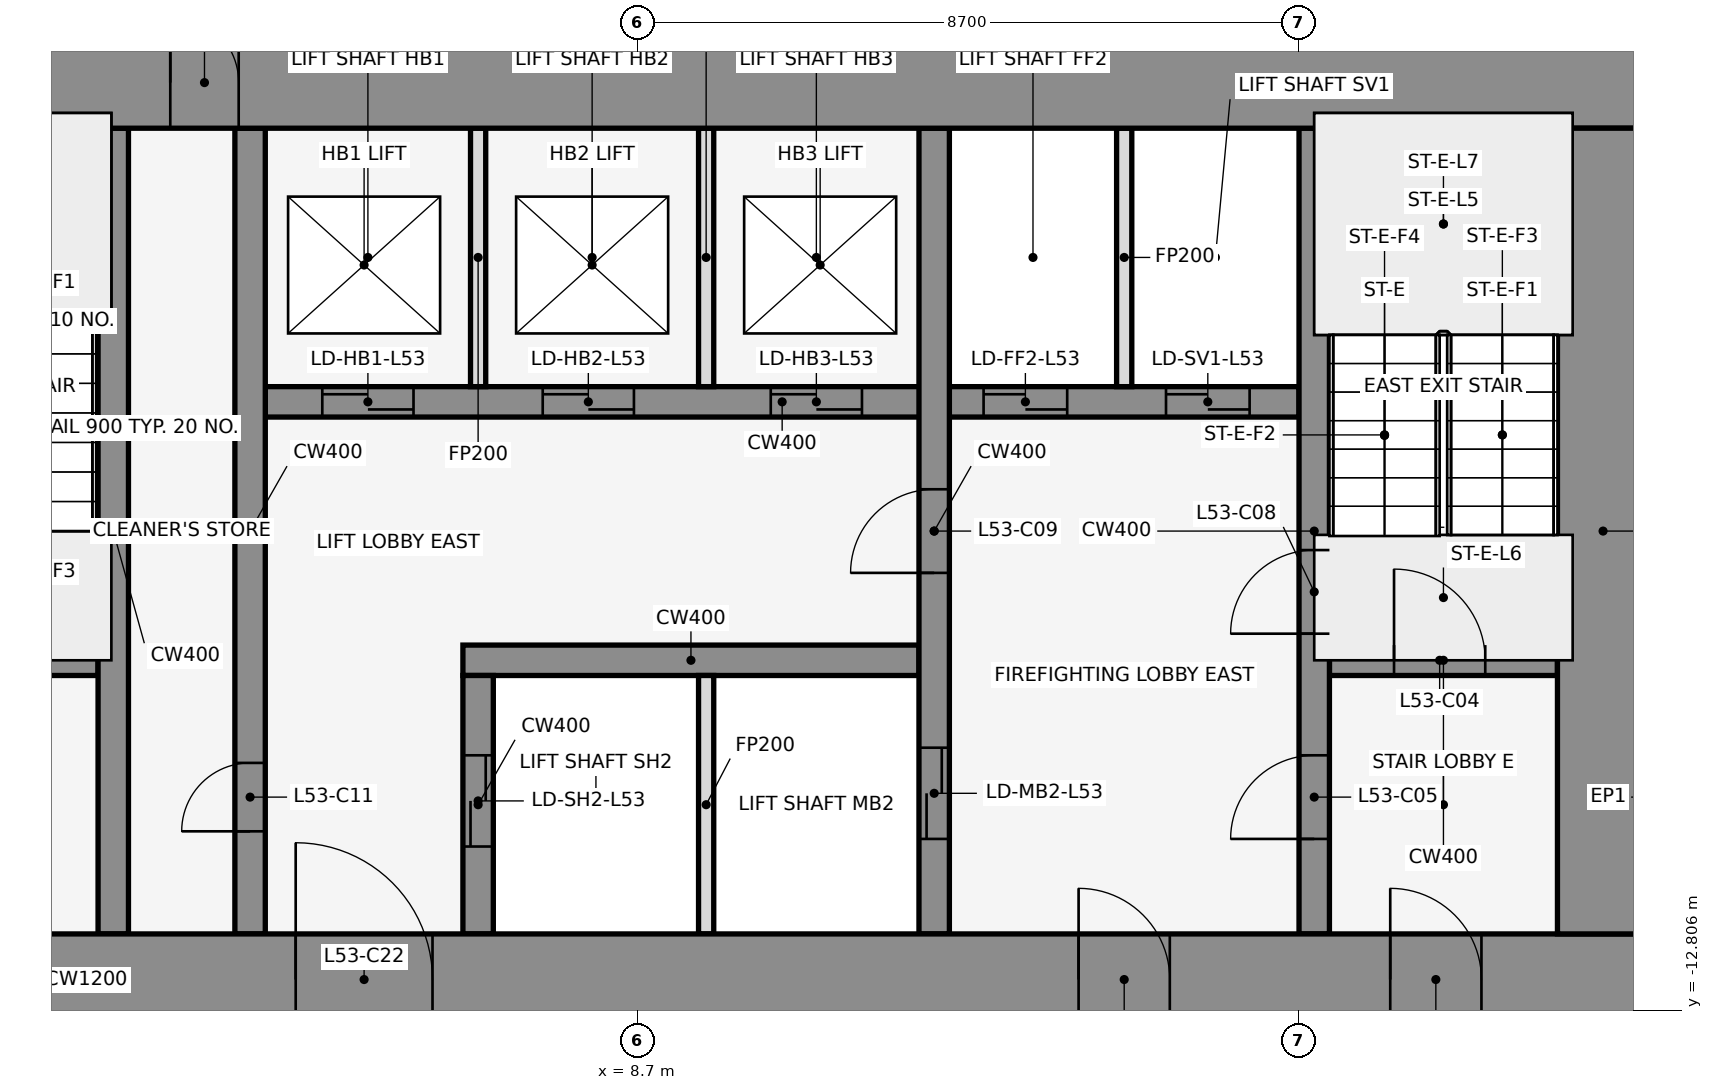
"""IFC4 building model, lengths in metres.
Left out: names, types, materials, properties, quantities, classifications, styles, units other than length and angle.
Written with IfcOpenShell. Run it as: python <this file> out.ifc"""

import sys

from ifc_helpers import new_model, si_unit, direction, frame, frame_2d, origin, place, context, subcontext, project, spatial, rectangle, extrude, element, fill, save


model = new_model("IFC4")
c1 = context("Model", 3, precision=1e-05, world=origin(), true_north=direction((0.0, 1.0)))
c2 = subcontext(c1, "Body", "Model", "MODEL_VIEW")
j1 = project(units=[si_unit("LENGTHUNIT", "METRE"), si_unit("PLANEANGLEUNIT", "RADIAN")], contexts=[c1])
p1 = place(None, origin())
s1 = spatial("IfcSite", under=j1, at=p1, CompositionType="ELEMENT")
p2 = place(p1, origin())
s2 = spatial("IfcBuilding", under=s1, at=p2, CompositionType="ELEMENT")
p3 = place(p2, frame((0.0, 0.0, 236.0)))
s3 = spatial("IfcBuildingStorey", under=s2, at=p3, CompositionType="ELEMENT", Elevation=236.0)
for number, where, z_axis, x_axis in (
    (1, (16.432, -0.105, 0.0), (0.0, 0.0, 1.0), (-0.84, 0.543, 0.0)),
    (2, (1.901, 1.08, 0.0), (0.0, 0.0, 1.0), (-0.84, -0.543, 0.0)),
):
    element("IfcWall", number, at=place(p3, frame(where, z_axis=z_axis, x_axis=x_axis)), inside=s3, PredefinedType="STANDARD", context=c2, shape_type="SweptSolid", body=[
        extrude(rectangle(XDim=2.183, YDim=0.25, at=frame_2d((1.091, 0.0))), origin(), (0.0, 0.0, 1.0), 5.25),
    ])
p4 = place(p3, frame((-1.6, -8.2, 0.0), z_axis=(0.0, 0.0, 1.0), x_axis=(1.0, 0.0, 0.0)))
e3 = element("IfcWall", 3, at=p4, inside=s3, PredefinedType="SHEAR", context=c2, shape_type="SweptSolid", body=[
    extrude(rectangle(XDim=3.2, YDim=0.4, at=frame_2d((1.6, 0.0))), origin(), (0.0, 0.0, 1.0), 5.4),
])
p5 = place(p4, frame((1.05, 0.0, 0.0)))
e4 = element("IfcOpeningElement", 4, at=p5, cuts=e3, PredefinedType="OPENING", context=c2, shape_type="SweptSolid", body=[
    extrude(rectangle(XDim=1.2, YDim=2.1, at=frame_2d((0.6, 1.05))), frame((0.0, 0.212, 0.0), z_axis=(0.0, -1.0, 0.0), x_axis=(1.0, 0.0, 0.0)), (0.0, 0.0, 1.0), 0.424),
])
p6 = place(p3, frame((6.4, -8.2, 0.0), z_axis=(0.0, 0.0, 1.0), x_axis=(1.0, 0.0, 0.0)))
e5 = element("IfcWall", 5, at=p6, inside=s3, PredefinedType="SHEAR", context=c2, shape_type="SweptSolid", body=[
    extrude(rectangle(XDim=6.0, YDim=0.4, at=frame_2d((3.0, 0.0))), origin(), (0.0, 0.0, 1.0), 5.4),
])
p7 = place(p3, frame((17.8, -8.2, 0.0), z_axis=(0.0, 0.0, 1.0), x_axis=(1.0, 0.0, 0.0)))
e6 = element("IfcWall", 6, at=p7, inside=s3, PredefinedType="SHEAR", context=c2, shape_type="SweptSolid", body=[
    extrude(rectangle(XDim=3.0, YDim=0.4, at=frame_2d((1.5, 0.0))), origin(), (0.0, 0.0, 1.0), 5.4),
])
p8 = place(p7, frame((0.85, 0.0, 0.0)))
e7 = element("IfcOpeningElement", 7, at=p8, cuts=e6, PredefinedType="OPENING", context=c2, shape_type="SweptSolid", body=[
    extrude(rectangle(XDim=1.2, YDim=2.1, at=frame_2d((0.6, 1.05))), frame((0.0, 0.212, 0.0), z_axis=(0.0, -1.0, 0.0), x_axis=(1.0, 0.0, 0.0)), (0.0, 0.0, 1.0), 0.424),
])
p9 = place(p3, frame((3.8, -4.8, 0.0), z_axis=(0.0, 0.0, 1.0), x_axis=(1.0, 0.0, 0.0)))
e8 = element("IfcWall", 8, at=p9, inside=s3, PredefinedType="SHEAR", context=c2, shape_type="SweptSolid", body=[
    extrude(rectangle(XDim=13.6, YDim=0.4, at=frame_2d((6.8, 0.0))), origin(), (0.0, 0.0, 1.0), 5.4),
])
p10 = place(p9, frame((0.75, 0.0, 0.0)))
e9 = element("IfcOpeningElement", 9, at=p10, cuts=e8, PredefinedType="OPENING", context=c2, shape_type="SweptSolid", body=[
    extrude(rectangle(XDim=1.2, YDim=2.1, at=frame_2d((0.6, 1.05))), frame((0.0, 0.212, 0.0), z_axis=(0.0, -1.0, 0.0), x_axis=(1.0, 0.0, 0.0)), (0.0, 0.0, 1.0), 0.424),
])
p11 = place(p9, frame((3.65, 0.0, 0.0)))
e10 = element("IfcOpeningElement", 10, at=p11, cuts=e8, PredefinedType="OPENING", context=c2, shape_type="SweptSolid", body=[
    extrude(rectangle(XDim=1.2, YDim=2.1, at=frame_2d((0.6, 1.05))), frame((0.0, 0.212, 0.0), z_axis=(0.0, -1.0, 0.0), x_axis=(1.0, 0.0, 0.0)), (0.0, 0.0, 1.0), 0.424),
])
p12 = place(p9, frame((6.65, 0.0, 0.0)))
e11 = element("IfcOpeningElement", 11, at=p12, cuts=e8, PredefinedType="OPENING", context=c2, shape_type="SweptSolid", body=[
    extrude(rectangle(XDim=1.2, YDim=2.1, at=frame_2d((0.6, 1.05))), frame((0.0, 0.212, 0.0), z_axis=(0.0, -1.0, 0.0), x_axis=(1.0, 0.0, 0.0)), (0.0, 0.0, 1.0), 0.424),
])
p13 = place(p9, frame((9.45, 0.0, 0.0)))
e12 = element("IfcOpeningElement", 12, at=p13, cuts=e8, PredefinedType="OPENING", context=c2, shape_type="SweptSolid", body=[
    extrude(rectangle(XDim=1.1, YDim=2.1, at=frame_2d((0.55, 1.05))), frame((0.0, 0.212, 0.0), z_axis=(0.0, -1.0, 0.0), x_axis=(1.0, 0.0, 0.0)), (0.0, 0.0, 1.0), 0.424),
])
p14 = place(p9, frame((11.85, 0.0, 0.0)))
e13 = element("IfcOpeningElement", 13, at=p14, cuts=e8, PredefinedType="OPENING", context=c2, shape_type="SweptSolid", body=[
    extrude(rectangle(XDim=1.1, YDim=2.1, at=frame_2d((0.55, 1.05))), frame((0.0, 0.212, 0.0), z_axis=(0.0, -1.0, 0.0), x_axis=(1.0, 0.0, 0.0)), (0.0, 0.0, 1.0), 0.424),
])
p15 = place(p3, frame((1.8, -11.8, 0.0), z_axis=(0.0, 0.0, 1.0), x_axis=(0.0, 1.0, 0.0)))
e14 = element("IfcWall", 14, at=p15, inside=s3, PredefinedType="SHEAR", context=c2, shape_type="SweptSolid", body=[
    extrude(rectangle(XDim=10.6, YDim=0.4, at=frame_2d((5.3, 0.0))), origin(), (0.0, 0.0, 1.0), 5.4),
])
p16 = place(p3, frame((3.6, -11.8, 0.0), z_axis=(0.0, 0.0, 1.0), x_axis=(0.0, 1.0, 0.0)))
e15 = element("IfcWall", 15, at=p16, inside=s3, PredefinedType="SHEAR", context=c2, shape_type="SweptSolid", body=[
    extrude(rectangle(XDim=10.6, YDim=0.4, at=frame_2d((5.3, 0.0))), origin(), (0.0, 0.0, 1.0), 5.4),
])
p17 = place(p16, frame((1.35, 0.0, 0.0)))
e16 = element("IfcOpeningElement", 16, at=p17, cuts=e15, PredefinedType="OPENING", context=c2, shape_type="SweptSolid", body=[
    extrude(rectangle(XDim=0.9, YDim=2.1, at=frame_2d((0.45, 1.05))), frame((0.0, 0.212, 0.0), z_axis=(0.0, -1.0, 0.0), x_axis=(1.0, 0.0, 0.0)), (0.0, 0.0, 1.0), 0.424),
])
p18 = place(p3, frame((6.6, -11.8, 0.0), z_axis=(0.0, 0.0, 1.0), x_axis=(0.0, 1.0, 0.0)))
e17 = element("IfcWall", 17, at=p18, inside=s3, PredefinedType="SHEAR", context=c2, shape_type="SweptSolid", body=[
    extrude(rectangle(XDim=3.4, YDim=0.4, at=frame_2d((1.7, 0.0))), origin(), (0.0, 0.0, 1.0), 5.4),
])
p19 = place(p18, frame((1.15, 0.0, 0.0)))
e18 = element("IfcOpeningElement", 18, at=p19, cuts=e17, PredefinedType="OPENING", context=c2, shape_type="SweptSolid", body=[
    extrude(rectangle(XDim=1.2, YDim=2.1, at=frame_2d((0.6, 1.05))), frame((0.0, 0.212, 0.0), z_axis=(0.0, -1.0, 0.0), x_axis=(1.0, 0.0, 0.0)), (0.0, 0.0, 1.0), 0.424),
])
for number, where, z_axis, x_axis in (
    (19, (6.6, -4.6, 0.0), (0.0, 0.0, 1.0), (0.0, 1.0, 0.0)),
    (20, (9.6, -11.8, 0.0), (0.0, 0.0, 1.0), (0.0, 1.0, 0.0)),
    (21, (9.6, -4.6, 0.0), (0.0, 0.0, 1.0), (0.0, 1.0, 0.0)),
):
    element("IfcWall", number, at=place(p3, frame(where, z_axis=z_axis, x_axis=x_axis)), inside=s3, PredefinedType="PARTITIONING", context=c2, shape_type="SweptSolid", body=[
        extrude(rectangle(XDim=3.4, YDim=0.2, at=frame_2d((1.7, 0.0))), origin(), (0.0, 0.0, 1.0), 4.318),
    ])
p20 = place(p3, frame((12.6, -11.8, 0.0), z_axis=(0.0, 0.0, 1.0), x_axis=(0.0, 1.0, 0.0)))
e22 = element("IfcWall", 22, at=p20, inside=s3, PredefinedType="SHEAR", context=c2, shape_type="SweptSolid", body=[
    extrude(rectangle(XDim=10.6, YDim=0.4, at=frame_2d((5.3, 0.0))), origin(), (0.0, 0.0, 1.0), 5.4),
])
p21 = place(p20, frame((1.25, 0.0, 0.0)))
e23 = element("IfcOpeningElement", 23, at=p21, cuts=e22, PredefinedType="OPENING", context=c2, shape_type="SweptSolid", body=[
    extrude(rectangle(XDim=1.2, YDim=2.1, at=frame_2d((0.6, 1.05))), frame((0.0, 0.212, 0.0), z_axis=(0.0, -1.0, 0.0), x_axis=(1.0, 0.0, 0.0)), (0.0, 0.0, 1.0), 0.424),
])
p22 = place(p20, frame((4.75, 0.0, 0.0)))
e24 = element("IfcOpeningElement", 24, at=p22, cuts=e22, PredefinedType="OPENING", context=c2, shape_type="SweptSolid", body=[
    extrude(rectangle(XDim=1.1, YDim=2.1, at=frame_2d((0.55, 1.05))), frame((0.0, 0.212, 0.0), z_axis=(0.0, -1.0, 0.0), x_axis=(1.0, 0.0, 0.0)), (0.0, 0.0, 1.0), 0.424),
])
p23 = place(p3, frame((15.1, -4.6, 0.0), z_axis=(0.0, 0.0, 1.0), x_axis=(0.0, 1.0, 0.0)))
e25 = element("IfcWall", 25, at=p23, inside=s3, PredefinedType="PARTITIONING", context=c2, shape_type="SweptSolid", body=[
    extrude(rectangle(XDim=3.4, YDim=0.2, at=frame_2d((1.7, 0.0))), origin(), (0.0, 0.0, 1.0), 4.318),
])
p24 = place(p3, frame((17.6, -11.8, 0.0), z_axis=(0.0, 0.0, 1.0), x_axis=(0.0, 1.0, 0.0)))
e26 = element("IfcWall", 26, at=p24, inside=s3, PredefinedType="SHEAR", context=c2, shape_type="SweptSolid", body=[
    extrude(rectangle(XDim=10.6, YDim=0.4, at=frame_2d((5.3, 0.0))), origin(), (0.0, 0.0, 1.0), 5.4),
])
p25 = place(p24, frame((1.25, 0.0, 0.0)))
e27 = element("IfcOpeningElement", 27, at=p25, cuts=e26, PredefinedType="OPENING", context=c2, shape_type="SweptSolid", body=[
    extrude(rectangle(XDim=1.1, YDim=2.1, at=frame_2d((0.55, 1.05))), frame((0.0, 0.212, 0.0), z_axis=(0.0, -1.0, 0.0), x_axis=(1.0, 0.0, 0.0)), (0.0, 0.0, 1.0), 0.424),
])
p26 = place(p24, frame((3.95, 0.0, 0.0)))
e28 = element("IfcOpeningElement", 28, at=p26, cuts=e26, PredefinedType="OPENING", context=c2, shape_type="SweptSolid", body=[
    extrude(rectangle(XDim=1.1, YDim=2.1, at=frame_2d((0.55, 1.05))), frame((0.0, 0.212, 0.0), z_axis=(0.0, -1.0, 0.0), x_axis=(1.0, 0.0, 0.0)), (0.0, 0.0, 1.0), 0.424),
])
p27 = place(p3, frame((-22.0, -0.6, 0.0), z_axis=(0.0, 0.0, 1.0), x_axis=(1.0, 0.0, 0.0)))
e29 = element("IfcWall", 29, at=p27, inside=s3, PredefinedType="SHEAR", context=c2, shape_type="SweptSolid", body=[
    extrude(rectangle(XDim=44.0, YDim=1.2, at=frame_2d((22.0, 0.0))), origin(), (0.0, 0.0, 1.0), 5.4),
])
p28 = place(p27, frame((18.55, 0.0, 0.0)))
e30 = element("IfcOpeningElement", 30, at=p28, cuts=e29, PredefinedType="OPENING", context=c2, shape_type="SweptSolid", body=[
    extrude(rectangle(XDim=0.9, YDim=2.1, at=frame_2d((0.45, 1.05))), frame((0.0, 0.612, 0.0), z_axis=(0.0, -1.0, 0.0), x_axis=(1.0, 0.0, 0.0)), (0.0, 0.0, 1.0), 1.224),
])
p29 = place(p27, frame((24.55, 0.0, 0.0)))
e31 = element("IfcOpeningElement", 31, at=p29, cuts=e29, PredefinedType="OPENING", context=c2, shape_type="SweptSolid", body=[
    extrude(rectangle(XDim=0.9, YDim=2.1, at=frame_2d((0.45, 1.05))), frame((0.0, 0.612, 0.0), z_axis=(0.0, -1.0, 0.0), x_axis=(1.0, 0.0, 0.0)), (0.0, 0.0, 1.0), 1.224),
])
p30 = place(p3, frame((-22.0, -12.4, 0.0), z_axis=(0.0, 0.0, 1.0), x_axis=(1.0, 0.0, 0.0)))
e32 = element("IfcWall", 32, at=p30, inside=s3, PredefinedType="SHEAR", context=c2, shape_type="SweptSolid", body=[
    extrude(rectangle(XDim=44.0, YDim=1.2, at=frame_2d((22.0, 0.0))), origin(), (0.0, 0.0, 1.0), 5.4),
])
p31 = place(p30, frame((2.2, 0.0, 0.0)))
e33 = element("IfcOpeningElement", 33, at=p31, cuts=e32, PredefinedType="OPENING", context=c2, shape_type="SweptSolid", body=[
    extrude(rectangle(XDim=1.2, YDim=2.1, at=frame_2d((0.6, 1.05))), frame((0.0, 0.612, 0.0), z_axis=(0.0, -1.0, 0.0), x_axis=(1.0, 0.0, 0.0)), (0.0, 0.0, 1.0), 1.224),
])
p32 = place(p30, frame((21.4, 0.0, 0.0)))
e34 = element("IfcOpeningElement", 34, at=p32, cuts=e32, PredefinedType="OPENING", context=c2, shape_type="SweptSolid", body=[
    extrude(rectangle(XDim=1.2, YDim=2.1, at=frame_2d((0.6, 1.05))), frame((0.0, 0.612, 0.0), z_axis=(0.0, -1.0, 0.0), x_axis=(1.0, 0.0, 0.0)), (0.0, 0.0, 1.0), 1.224),
])
p33 = place(p30, frame((40.6, 0.0, 0.0)))
e35 = element("IfcOpeningElement", 35, at=p33, cuts=e32, PredefinedType="OPENING", context=c2, shape_type="SweptSolid", body=[
    extrude(rectangle(XDim=1.2, YDim=2.1, at=frame_2d((0.6, 1.05))), frame((0.0, 0.612, 0.0), z_axis=(0.0, -1.0, 0.0), x_axis=(1.0, 0.0, 0.0)), (0.0, 0.0, 1.0), 1.224),
])
p34 = place(p30, frame((16.0, 0.0, 0.0)))
e36 = element("IfcOpeningElement", 36, at=p34, cuts=e32, PredefinedType="OPENING", context=c2, shape_type="SweptSolid", body=[
    extrude(rectangle(XDim=1.8, YDim=2.1, at=frame_2d((0.9, 1.05))), frame((0.0, 0.612, 0.0), z_axis=(0.0, -1.0, 0.0), x_axis=(1.0, 0.0, 0.0)), (0.0, 0.0, 1.0), 1.224),
])
p35 = place(p30, frame((6.3, 0.0, 0.0)))
e37 = element("IfcOpeningElement", 37, at=p35, cuts=e32, PredefinedType="OPENING", context=c2, shape_type="SweptSolid", body=[
    extrude(rectangle(XDim=1.2, YDim=2.1, at=frame_2d((0.6, 1.05))), frame((0.0, 0.612, 0.0), z_axis=(0.0, -1.0, 0.0), x_axis=(1.0, 0.0, 0.0)), (0.0, 0.0, 1.0), 1.224),
])
p36 = place(p30, frame((26.2, 0.0, 0.0)))
e38 = element("IfcOpeningElement", 38, at=p36, cuts=e32, PredefinedType="OPENING", context=c2, shape_type="SweptSolid", body=[
    extrude(rectangle(XDim=1.8, YDim=2.1, at=frame_2d((0.9, 1.05))), frame((0.0, 0.612, 0.0), z_axis=(0.0, -1.0, 0.0), x_axis=(1.0, 0.0, 0.0)), (0.0, 0.0, 1.0), 1.224),
])
p37 = place(p30, frame((36.5, 0.0, 0.0)))
e39 = element("IfcOpeningElement", 39, at=p37, cuts=e32, PredefinedType="OPENING", context=c2, shape_type="SweptSolid", body=[
    extrude(rectangle(XDim=1.2, YDim=2.1, at=frame_2d((0.6, 1.05))), frame((0.0, 0.612, 0.0), z_axis=(0.0, -1.0, 0.0), x_axis=(1.0, 0.0, 0.0)), (0.0, 0.0, 1.0), 1.224),
])
p38 = place(p3, frame((21.4, -11.8, 0.0), z_axis=(0.0, 0.0, 1.0), x_axis=(0.0, 1.0, 0.0)))
e40 = element("IfcWall", 40, at=p38, inside=s3, PredefinedType="SHEAR", context=c2, shape_type="SweptSolid", body=[
    extrude(rectangle(XDim=10.6, YDim=1.2, at=frame_2d((5.3, 0.0))), origin(), (0.0, 0.0, 1.0), 5.4),
])
p39 = place(p8, origin())
e41 = element("IfcDoor", 41, at=p39, inside=s3, OperationType="SINGLE_SWING_RIGHT", PredefinedType="DOOR", context=c2, shape_type="SweptSolid", body=[
    extrude(rectangle(XDim=1.2, YDim=2.1, at=frame_2d((0.6, 1.05))), frame((0.0, 0.025, 0.0), z_axis=(0.0, -1.0, 0.0), x_axis=(1.0, 0.0, 0.0)), (0.0, 0.0, 1.0), 0.05),
])
fill(e7, e41)
p40 = place(p25, origin())
e42 = element("IfcDoor", 42, at=p40, inside=s3, OperationType="SINGLE_SWING_LEFT", PredefinedType="DOOR", context=c2, shape_type="SweptSolid", body=[
    extrude(rectangle(XDim=1.1, YDim=2.1, at=frame_2d((0.55, 1.05))), frame((0.0, 0.025, 0.0), z_axis=(0.0, -1.0, 0.0), x_axis=(1.0, 0.0, 0.0)), (0.0, 0.0, 1.0), 0.05),
])
fill(e27, e42)
p41 = place(p10, origin())
e43 = element("IfcDoor", 43, at=p41, inside=s3, OperationType="DOUBLE_DOOR_SLIDING", PredefinedType="DOOR", context=c2, shape_type="SweptSolid", body=[
    extrude(rectangle(XDim=1.2, YDim=2.1, at=frame_2d((0.6, 1.05))), frame((0.0, 0.025, 0.0), z_axis=(0.0, -1.0, 0.0), x_axis=(1.0, 0.0, 0.0)), (0.0, 0.0, 1.0), 0.05),
])
fill(e9, e43)
p42 = place(p11, origin())
e44 = element("IfcDoor", 44, at=p42, inside=s3, OperationType="DOUBLE_DOOR_SLIDING", PredefinedType="DOOR", context=c2, shape_type="SweptSolid", body=[
    extrude(rectangle(XDim=1.2, YDim=2.1, at=frame_2d((0.6, 1.05))), frame((0.0, 0.025, 0.0), z_axis=(0.0, -1.0, 0.0), x_axis=(1.0, 0.0, 0.0)), (0.0, 0.0, 1.0), 0.05),
])
fill(e10, e44)
p43 = place(p12, origin())
e45 = element("IfcDoor", 45, at=p43, inside=s3, OperationType="DOUBLE_DOOR_SLIDING", PredefinedType="DOOR", context=c2, shape_type="SweptSolid", body=[
    extrude(rectangle(XDim=1.2, YDim=2.1, at=frame_2d((0.6, 1.05))), frame((0.0, 0.025, 0.0), z_axis=(0.0, -1.0, 0.0), x_axis=(1.0, 0.0, 0.0)), (0.0, 0.0, 1.0), 0.05),
])
fill(e11, e45)
p44 = place(p19, origin())
e46 = element("IfcDoor", 46, at=p44, inside=s3, OperationType="DOUBLE_DOOR_SLIDING", PredefinedType="DOOR", context=c2, shape_type="SweptSolid", body=[
    extrude(rectangle(XDim=1.2, YDim=2.1, at=frame_2d((0.6, 1.05))), frame((0.0, 0.025, 0.0), z_axis=(0.0, -1.0, 0.0), x_axis=(1.0, 0.0, 0.0)), (0.0, 0.0, 1.0), 0.05),
])
fill(e18, e46)
p45 = place(p21, origin())
e47 = element("IfcDoor", 47, at=p45, inside=s3, OperationType="DOUBLE_DOOR_SLIDING", PredefinedType="DOOR", context=c2, shape_type="SweptSolid", body=[
    extrude(rectangle(XDim=1.2, YDim=2.1, at=frame_2d((0.6, 1.05))), frame((0.0, 0.025, 0.0), z_axis=(0.0, -1.0, 0.0), x_axis=(1.0, 0.0, 0.0)), (0.0, 0.0, 1.0), 0.05),
])
fill(e23, e47)
p46 = place(p13, origin())
e48 = element("IfcDoor", 48, at=p46, inside=s3, OperationType="DOUBLE_DOOR_SLIDING", PredefinedType="DOOR", context=c2, shape_type="SweptSolid", body=[
    extrude(rectangle(XDim=1.1, YDim=2.1, at=frame_2d((0.55, 1.05))), frame((0.0, 0.025, 0.0), z_axis=(0.0, -1.0, 0.0), x_axis=(1.0, 0.0, 0.0)), (0.0, 0.0, 1.0), 0.05),
])
fill(e12, e48)
p47 = place(p14, origin())
e49 = element("IfcDoor", 49, at=p47, inside=s3, OperationType="DOUBLE_DOOR_SLIDING", PredefinedType="DOOR", context=c2, shape_type="SweptSolid", body=[
    extrude(rectangle(XDim=1.1, YDim=2.1, at=frame_2d((0.55, 1.05))), frame((0.0, 0.025, 0.0), z_axis=(0.0, -1.0, 0.0), x_axis=(1.0, 0.0, 0.0)), (0.0, 0.0, 1.0), 0.05),
])
fill(e13, e49)
p48 = place(p26, origin())
e50 = element("IfcDoor", 50, at=p48, inside=s3, OperationType="SINGLE_SWING_RIGHT", PredefinedType="DOOR", context=c2, shape_type="SweptSolid", body=[
    extrude(rectangle(XDim=1.1, YDim=2.1, at=frame_2d((0.55, 1.05))), frame((0.0, 0.025, 0.0), z_axis=(0.0, -1.0, 0.0), x_axis=(1.0, 0.0, 0.0)), (0.0, 0.0, 1.0), 0.05),
])
fill(e28, e50)
p49 = place(p22, frame((1.1, 0.0, 0.0), z_axis=(0.0, 0.0, 1.0), x_axis=(-1.0, 0.0, 0.0)))
e51 = element("IfcDoor", 51, at=p49, inside=s3, OperationType="SINGLE_SWING_RIGHT", PredefinedType="DOOR", context=c2, shape_type="SweptSolid", body=[
    extrude(rectangle(XDim=1.1, YDim=2.1, at=frame_2d((0.55, 1.05))), frame((0.0, 0.025, 0.0), z_axis=(0.0, -1.0, 0.0), x_axis=(1.0, 0.0, 0.0)), (0.0, 0.0, 1.0), 0.05),
])
fill(e24, e51)
p50 = place(p17, origin())
e52 = element("IfcDoor", 52, at=p50, inside=s3, OperationType="SINGLE_SWING_LEFT", PredefinedType="DOOR", context=c2, shape_type="SweptSolid", body=[
    extrude(rectangle(XDim=0.9, YDim=2.1, at=frame_2d((0.45, 1.05))), frame((0.0, 0.025, 0.0), z_axis=(0.0, -1.0, 0.0), x_axis=(1.0, 0.0, 0.0)), (0.0, 0.0, 1.0), 0.05),
])
fill(e16, e52)
p51 = place(p29, origin())
e53 = element("IfcDoor", 53, at=p51, inside=s3, OperationType="SINGLE_SWING_LEFT", PredefinedType="DOOR", context=c2, shape_type="SweptSolid", body=[
    extrude(rectangle(XDim=0.9, YDim=2.1, at=frame_2d((0.45, 1.05))), frame((0.0, 0.025, 0.0), z_axis=(0.0, -1.0, 0.0), x_axis=(1.0, 0.0, 0.0)), (0.0, 0.0, 1.0), 0.05),
])
fill(e31, e53)
p52 = place(p33, frame((1.2, 0.0, 0.0), z_axis=(0.0, 0.0, 1.0), x_axis=(-1.0, 0.0, 0.0)))
e54 = element("IfcDoor", 54, at=p52, inside=s3, OperationType="SINGLE_SWING_RIGHT", PredefinedType="DOOR", context=c2, shape_type="SweptSolid", body=[
    extrude(rectangle(XDim=1.2, YDim=2.1, at=frame_2d((0.6, 1.05))), frame((0.0, 0.025, 0.0), z_axis=(0.0, -1.0, 0.0), x_axis=(1.0, 0.0, 0.0)), (0.0, 0.0, 1.0), 0.05),
])
fill(e35, e54)
p53 = place(p36, origin())
e55 = element("IfcDoor", 55, at=p53, inside=s3, OperationType="SINGLE_SWING_LEFT", PredefinedType="DOOR", context=c2, shape_type="SweptSolid", body=[
    extrude(rectangle(XDim=1.8, YDim=2.1, at=frame_2d((0.9, 1.05))), frame((0.0, 0.025, 0.0), z_axis=(0.0, -1.0, 0.0), x_axis=(1.0, 0.0, 0.0)), (0.0, 0.0, 1.0), 0.05),
])
fill(e38, e55)
p54 = place(p37, frame((1.2, 0.0, 0.0), z_axis=(0.0, 0.0, 1.0), x_axis=(-1.0, 0.0, 0.0)))
e56 = element("IfcDoor", 56, at=p54, inside=s3, OperationType="SINGLE_SWING_RIGHT", PredefinedType="DOOR", context=c2, shape_type="SweptSolid", body=[
    extrude(rectangle(XDim=1.2, YDim=2.1, at=frame_2d((0.6, 1.05))), frame((0.0, 0.025, 0.0), z_axis=(0.0, -1.0, 0.0), x_axis=(1.0, 0.0, 0.0)), (0.0, 0.0, 1.0), 0.05),
])
fill(e39, e56)
save(model, sys.argv[1])
